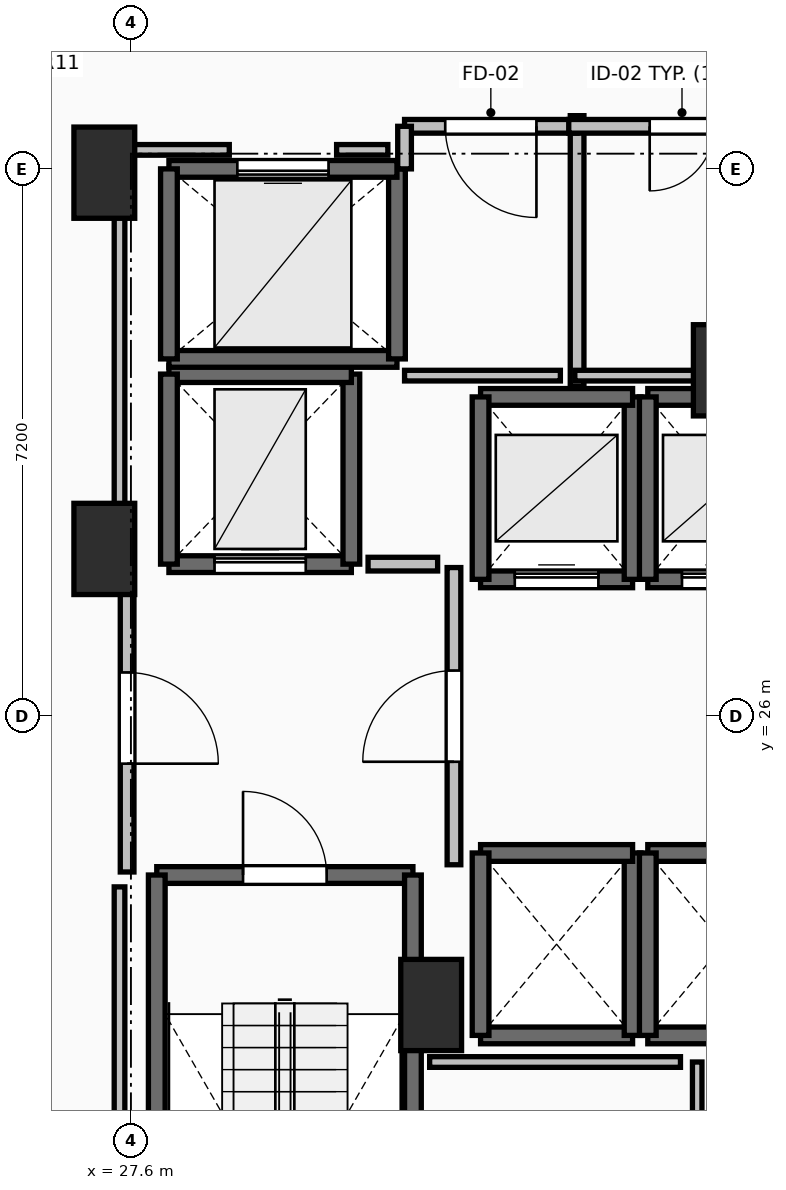
"""IFC4 building model, lengths in metres.
Left out: names, types, materials, properties, quantities, classifications, styles, units other than length and angle.
Written with IfcOpenShell. Run it as: python <this file> out.ifc"""

import sys

from ifc_helpers import new_model, si_unit, direction, frame, frame_2d, origin, origin_2d, place, context, subcontext, project, spatial, rectangle, extrude, element, fill, save


model = new_model("IFC4")
c1 = context("Model", 3, precision=1e-05, world=origin(), true_north=direction((0.0, 1.0)))
c2 = subcontext(c1, "Body", "Model", "MODEL_VIEW")
j1 = project(units=[si_unit("LENGTHUNIT", "METRE"), si_unit("PLANEANGLEUNIT", "RADIAN")], contexts=[c1])
p1 = place(None, origin())
s1 = spatial("IfcSite", under=j1, at=p1, CompositionType="ELEMENT")
p2 = place(p1, origin())
s2 = spatial("IfcBuilding", under=s1, at=p2, CompositionType="ELEMENT")
p3 = place(p2, frame((0.0, 0.0, 31.0)))
s3 = spatial("IfcBuildingStorey", under=s2, at=p3, CompositionType="ELEMENT", Elevation=31.0)
for number, where, z_axis, x_axis in (
    (1, (27.25, 28.2, 0.0), (0.0, 0.0, 1.0), (1.0, 0.0, 0.0)),
    (2, (27.25, 33.15, 0.0), (0.0, 0.0, 1.0), (1.0, 0.0, 0.0)),
    (3, (31.55, 22.2, 0.0), (0.0, 0.0, 1.0), (1.0, 0.0, 0.0)),
    (4, (35.4, 30.55, 0.0), (0.0, 0.0, 1.0), (1.0, 0.0, 0.0)),
):
    element("IfcColumn", number, at=place(p3, frame(where, z_axis=z_axis, x_axis=x_axis)), inside=s3, PredefinedType="PILASTER", context=c2, shape_type="SweptSolid", body=[
        extrude(rectangle(XDim=0.8, YDim=1.2, at=origin_2d()), origin(), (0.0, 0.0, 1.0), 3.5),
    ])
p4 = place(p3, frame((27.94, 23.91, 0.0), z_axis=(0.0, 0.0, 1.0), x_axis=(1.0, 0.0, 0.0)))
e5 = element("IfcWall", 5, at=p4, inside=s3, PredefinedType="SOLIDWALL", context=c2, shape_type="SweptSolid", body=[
    extrude(rectangle(XDim=3.37, YDim=0.22, at=frame_2d((1.685, 0.0))), origin(), (0.0, 0.0, 1.0), 3.24),
])
p5 = place(p4, frame((1.135, 0.0, 0.0)))
e6 = element("IfcOpeningElement", 6, at=p5, cuts=e5, PredefinedType="OPENING", context=c2, shape_type="SweptSolid", body=[
    extrude(rectangle(XDim=1.1, YDim=2.15, at=frame_2d((0.55, 1.075))), frame((0.0, 0.125, 0.0), z_axis=(0.0, -1.0, 0.0), x_axis=(1.0, 0.0, 0.0)), (0.0, 0.0, 1.0), 0.25),
])
for number, where, z_axis, x_axis in (
    (7, (31.31, 23.91, 0.0), (0.0, 0.0, 1.0), (0.0, -1.0, 0.0)),
    (8, (27.94, 16.49, 0.0), (0.0, 0.0, 1.0), (0.0, 1.0, 0.0)),
):
    element("IfcWall", number, at=place(p3, frame(where, z_axis=z_axis, x_axis=x_axis)), inside=s3, PredefinedType="SOLIDWALL", context=c2, shape_type="SweptSolid", body=[
        extrude(rectangle(XDim=7.42, YDim=0.22, at=frame_2d((3.71, 0.0))), origin(), (0.0, 0.0, 1.0), 3.24),
    ])
p6 = place(p3, frame((32.2, 27.8, 0.0), z_axis=(0.0, 0.0, 1.0), x_axis=(1.0, 0.0, 0.0)))
e9 = element("IfcWall", 9, at=p6, inside=s3, PredefinedType="SOLIDWALL", context=c2, shape_type="SweptSolid", body=[
    extrude(rectangle(XDim=2.0, YDim=0.22, at=frame_2d((1.0, 0.0))), origin(), (0.0, 0.0, 1.0), 3.24),
])
p7 = place(p6, frame((0.45, 0.0, 0.0)))
e10 = element("IfcOpeningElement", 10, at=p7, cuts=e9, PredefinedType="OPENING", context=c2, shape_type="SweptSolid", body=[
    extrude(rectangle(XDim=1.1, YDim=2.2, at=frame_2d((0.55, 1.1))), frame((0.0, 0.125, 0.0), z_axis=(0.0, -1.0, 0.0), x_axis=(1.0, 0.0, 0.0)), (0.0, 0.0, 1.0), 0.25),
])
p8 = place(p3, frame((34.2, 27.8, 0.0), z_axis=(0.0, 0.0, 1.0), x_axis=(0.0, 1.0, 0.0)))
e11 = element("IfcWall", 11, at=p8, inside=s3, PredefinedType="SOLIDWALL", context=c2, shape_type="SweptSolid", body=[
    extrude(rectangle(XDim=2.4, YDim=0.22, at=frame_2d((1.2, 0.0))), origin(), (0.0, 0.0, 1.0), 3.24),
])
p9 = place(p3, frame((34.2, 30.2, 0.0), z_axis=(0.0, 0.0, 1.0), x_axis=(-1.0, 0.0, 0.0)))
e12 = element("IfcWall", 12, at=p9, inside=s3, PredefinedType="SOLIDWALL", context=c2, shape_type="SweptSolid", body=[
    extrude(rectangle(XDim=2.0, YDim=0.22, at=frame_2d((1.0, 0.0))), origin(), (0.0, 0.0, 1.0), 3.24),
])
p10 = place(p3, frame((32.2, 30.2, 0.0), z_axis=(0.0, 0.0, 1.0), x_axis=(0.0, -1.0, 0.0)))
e13 = element("IfcWall", 13, at=p10, inside=s3, PredefinedType="SOLIDWALL", context=c2, shape_type="SweptSolid", body=[
    extrude(rectangle(XDim=2.4, YDim=0.22, at=frame_2d((1.2, 0.0))), origin(), (0.0, 0.0, 1.0), 3.24),
])
p11 = place(p3, frame((34.4, 27.8, 0.0), z_axis=(0.0, 0.0, 1.0), x_axis=(1.0, 0.0, 0.0)))
e14 = element("IfcWall", 14, at=p11, inside=s3, PredefinedType="SOLIDWALL", context=c2, shape_type="SweptSolid", body=[
    extrude(rectangle(XDim=2.0, YDim=0.22, at=frame_2d((1.0, 0.0))), origin(), (0.0, 0.0, 1.0), 3.24),
])
p12 = place(p11, frame((0.45, 0.0, 0.0)))
e15 = element("IfcOpeningElement", 15, at=p12, cuts=e14, PredefinedType="OPENING", context=c2, shape_type="SweptSolid", body=[
    extrude(rectangle(XDim=1.1, YDim=2.2, at=frame_2d((0.55, 1.1))), frame((0.0, 0.125, 0.0), z_axis=(0.0, -1.0, 0.0), x_axis=(1.0, 0.0, 0.0)), (0.0, 0.0, 1.0), 0.25),
])
p13 = place(p3, frame((36.4, 30.2, 0.0), z_axis=(0.0, 0.0, 1.0), x_axis=(-1.0, 0.0, 0.0)))
e16 = element("IfcWall", 16, at=p13, inside=s3, PredefinedType="SOLIDWALL", context=c2, shape_type="SweptSolid", body=[
    extrude(rectangle(XDim=2.0, YDim=0.22, at=frame_2d((1.0, 0.0))), origin(), (0.0, 0.0, 1.0), 3.24),
])
p14 = place(p3, frame((34.4, 30.2, 0.0), z_axis=(0.0, 0.0, 1.0), x_axis=(0.0, -1.0, 0.0)))
e17 = element("IfcWall", 17, at=p14, inside=s3, PredefinedType="SOLIDWALL", context=c2, shape_type="SweptSolid", body=[
    extrude(rectangle(XDim=2.4, YDim=0.22, at=frame_2d((1.2, 0.0))), origin(), (0.0, 0.0, 1.0), 3.24),
])
p15 = place(p3, frame((32.2, 21.8, 0.0), z_axis=(0.0, 0.0, 1.0), x_axis=(1.0, 0.0, 0.0)))
e18 = element("IfcWall", 18, at=p15, inside=s3, PredefinedType="SOLIDWALL", context=c2, shape_type="SweptSolid", body=[
    extrude(rectangle(XDim=2.0, YDim=0.22, at=frame_2d((1.0, 0.0))), origin(), (0.0, 0.0, 1.0), 3.24),
])
p16 = place(p3, frame((34.2, 21.8, 0.0), z_axis=(0.0, 0.0, 1.0), x_axis=(0.0, 1.0, 0.0)))
e19 = element("IfcWall", 19, at=p16, inside=s3, PredefinedType="SOLIDWALL", context=c2, shape_type="SweptSolid", body=[
    extrude(rectangle(XDim=2.4, YDim=0.22, at=frame_2d((1.2, 0.0))), origin(), (0.0, 0.0, 1.0), 3.24),
])
p17 = place(p3, frame((34.2, 24.2, 0.0), z_axis=(0.0, 0.0, 1.0), x_axis=(-1.0, 0.0, 0.0)))
e20 = element("IfcWall", 20, at=p17, inside=s3, PredefinedType="SOLIDWALL", context=c2, shape_type="SweptSolid", body=[
    extrude(rectangle(XDim=2.0, YDim=0.22, at=frame_2d((1.0, 0.0))), origin(), (0.0, 0.0, 1.0), 3.24),
])
p18 = place(p3, frame((32.2, 24.2, 0.0), z_axis=(0.0, 0.0, 1.0), x_axis=(0.0, -1.0, 0.0)))
e21 = element("IfcWall", 21, at=p18, inside=s3, PredefinedType="SOLIDWALL", context=c2, shape_type="SweptSolid", body=[
    extrude(rectangle(XDim=2.4, YDim=0.22, at=frame_2d((1.2, 0.0))), origin(), (0.0, 0.0, 1.0), 3.24),
])
for number, where, z_axis, x_axis in (
    (22, (34.4, 21.8, 0.0), (0.0, 0.0, 1.0), (1.0, 0.0, 0.0)),
    (23, (36.4, 24.2, 0.0), (0.0, 0.0, 1.0), (-1.0, 0.0, 0.0)),
):
    element("IfcWall", number, at=place(p3, frame(where, z_axis=z_axis, x_axis=x_axis)), inside=s3, PredefinedType="SOLIDWALL", context=c2, shape_type="SweptSolid", body=[
        extrude(rectangle(XDim=2.0, YDim=0.22, at=frame_2d((1.0, 0.0))), origin(), (0.0, 0.0, 1.0), 3.24),
    ])
p19 = place(p3, frame((34.4, 24.2, 0.0), z_axis=(0.0, 0.0, 1.0), x_axis=(0.0, -1.0, 0.0)))
e24 = element("IfcWall", 24, at=p19, inside=s3, PredefinedType="SOLIDWALL", context=c2, shape_type="SweptSolid", body=[
    extrude(rectangle(XDim=2.4, YDim=0.22, at=frame_2d((1.2, 0.0))), origin(), (0.0, 0.0, 1.0), 3.24),
])
p20 = place(p3, frame((28.1, 28.0, 0.0), z_axis=(0.0, 0.0, 1.0), x_axis=(1.0, 0.0, 0.0)))
e25 = element("IfcWall", 25, at=p20, inside=s3, PredefinedType="SHEAR", context=c2, shape_type="SweptSolid", body=[
    extrude(rectangle(XDim=2.4, YDim=0.22, at=frame_2d((1.2, 0.0))), origin(), (0.0, 0.0, 1.0), 3.24),
])
p21 = place(p20, frame((0.6, 0.0, 0.0)))
e26 = element("IfcOpeningElement", 26, at=p21, cuts=e25, PredefinedType="OPENING", context=c2, shape_type="SweptSolid", body=[
    extrude(rectangle(XDim=1.2, YDim=2.2, at=frame_2d((0.6, 1.1))), frame((0.0, 0.125, 0.0), z_axis=(0.0, -1.0, 0.0), x_axis=(1.0, 0.0, 0.0)), (0.0, 0.0, 1.0), 0.25),
])
p22 = place(p3, frame((30.5, 28.0, 0.0), z_axis=(0.0, 0.0, 1.0), x_axis=(0.0, 1.0, 0.0)))
e27 = element("IfcWall", 27, at=p22, inside=s3, PredefinedType="SHEAR", context=c2, shape_type="SweptSolid", body=[
    extrude(rectangle(XDim=2.5, YDim=0.22, at=frame_2d((1.25, 0.0))), origin(), (0.0, 0.0, 1.0), 3.24),
])
p23 = place(p3, frame((30.5, 30.5, 0.0), z_axis=(0.0, 0.0, 1.0), x_axis=(-1.0, 0.0, 0.0)))
e28 = element("IfcWall", 28, at=p23, inside=s3, PredefinedType="SHEAR", context=c2, shape_type="SweptSolid", body=[
    extrude(rectangle(XDim=2.4, YDim=0.22, at=frame_2d((1.2, 0.0))), origin(), (0.0, 0.0, 1.0), 3.24),
])
p24 = place(p3, frame((28.1, 30.5, 0.0), z_axis=(0.0, 0.0, 1.0), x_axis=(0.0, -1.0, 0.0)))
e29 = element("IfcWall", 29, at=p24, inside=s3, PredefinedType="SHEAR", context=c2, shape_type="SweptSolid", body=[
    extrude(rectangle(XDim=2.5, YDim=0.22, at=frame_2d((1.25, 0.0))), origin(), (0.0, 0.0, 1.0), 3.24),
])
p25 = place(p3, frame((28.1, 30.7, 0.0), z_axis=(0.0, 0.0, 1.0), x_axis=(1.0, 0.0, 0.0)))
e30 = element("IfcWall", 30, at=p25, inside=s3, PredefinedType="SOLIDWALL", context=c2, shape_type="SweptSolid", body=[
    extrude(rectangle(XDim=3.0, YDim=0.22, at=frame_2d((1.5, 0.0))), origin(), (0.0, 0.0, 1.0), 3.24),
])
p26 = place(p3, frame((31.1, 30.7, 0.0), z_axis=(0.0, 0.0, 1.0), x_axis=(0.0, 1.0, 0.0)))
e31 = element("IfcWall", 31, at=p26, inside=s3, PredefinedType="SOLIDWALL", context=c2, shape_type="SweptSolid", body=[
    extrude(rectangle(XDim=2.5, YDim=0.22, at=frame_2d((1.25, 0.0))), origin(), (0.0, 0.0, 1.0), 3.24),
])
p27 = place(p3, frame((31.1, 33.2, 0.0), z_axis=(0.0, 0.0, 1.0), x_axis=(-1.0, 0.0, 0.0)))
e32 = element("IfcWall", 32, at=p27, inside=s3, PredefinedType="SOLIDWALL", context=c2, shape_type="SweptSolid", body=[
    extrude(rectangle(XDim=3.0, YDim=0.22, at=frame_2d((1.5, 0.0))), origin(), (0.0, 0.0, 1.0), 3.24),
])
p28 = place(p27, frame((0.9, 0.0, 0.0)))
e33 = element("IfcOpeningElement", 33, at=p28, cuts=e32, PredefinedType="OPENING", context=c2, shape_type="SweptSolid", body=[
    extrude(rectangle(XDim=1.2, YDim=2.2, at=frame_2d((0.6, 1.1))), frame((0.0, 0.125, 0.0), z_axis=(0.0, -1.0, 0.0), x_axis=(1.0, 0.0, 0.0)), (0.0, 0.0, 1.0), 0.25),
])
p29 = place(p3, frame((28.1, 33.2, 0.0), z_axis=(0.0, 0.0, 1.0), x_axis=(0.0, -1.0, 0.0)))
e34 = element("IfcWall", 34, at=p29, inside=s3, PredefinedType="SOLIDWALL", context=c2, shape_type="SweptSolid", body=[
    extrude(rectangle(XDim=2.5, YDim=0.22, at=frame_2d((1.25, 0.0))), origin(), (0.0, 0.0, 1.0), 3.24),
])
p30 = place(p3, frame((31.85, 24.045, 0.0), z_axis=(0.0, 0.0, 1.0), x_axis=(0.0, 1.0, 0.0)))
e35 = element("IfcWall", 35, at=p30, inside=s3, PredefinedType="PARTITIONING", context=c2, shape_type="SweptSolid", body=[
    extrude(rectangle(XDim=3.91, YDim=0.18, at=frame_2d((1.955, 0.0))), origin(), (0.0, 0.0, 1.0), 3.24),
])
p31 = place(p30, frame((1.355, 0.0, 0.0)))
e36 = element("IfcOpeningElement", 36, at=p31, cuts=e35, PredefinedType="OPENING", context=c2, shape_type="SweptSolid", body=[
    extrude(rectangle(XDim=1.2, YDim=2.15, at=frame_2d((0.6, 1.075))), frame((0.0, 0.105, 0.0), z_axis=(0.0, -1.0, 0.0), x_axis=(1.0, 0.0, 0.0)), (0.0, 0.0, 1.0), 0.21),
])
p32 = place(p3, frame((27.55, 28.0, 0.0), z_axis=(0.0, 0.0, 1.0), x_axis=(0.0, -1.0, 0.0)))
e37 = element("IfcWall", 37, at=p32, inside=s3, PredefinedType="PARTITIONING", context=c2, shape_type="SweptSolid", body=[
    extrude(rectangle(XDim=4.05, YDim=0.18, at=frame_2d((2.025, 0.0))), origin(), (0.0, 0.0, 1.0), 3.24),
])
p33 = place(p32, frame((1.425, 0.0, 0.0)))
e38 = element("IfcOpeningElement", 38, at=p33, cuts=e37, PredefinedType="OPENING", context=c2, shape_type="SweptSolid", body=[
    extrude(rectangle(XDim=1.2, YDim=2.15, at=frame_2d((0.6, 1.075))), frame((0.0, 0.105, 0.0), z_axis=(0.0, -1.0, 0.0), x_axis=(1.0, 0.0, 0.0)), (0.0, 0.0, 1.0), 0.21),
])
p34 = place(p3, frame((33.47, 30.34, 0.0), z_axis=(0.0, 0.0, 1.0), x_axis=(0.0, 1.0, 0.0)))
e39 = element("IfcWall", 39, at=p34, inside=s3, PredefinedType="PARTITIONING", context=c2, shape_type="SweptSolid", body=[
    extrude(rectangle(XDim=3.56, YDim=0.18, at=frame_2d((1.78, 0.0))), origin(), (0.0, 0.0, 1.0), 3.24),
])
p35 = place(p3, frame((33.47, 33.76, 0.0), z_axis=(0.0, 0.0, 1.0), x_axis=(-1.0, 0.0, 0.0)))
e40 = element("IfcWall", 40, at=p35, inside=s3, PredefinedType="PARTITIONING", context=c2, shape_type="SweptSolid", body=[
    extrude(rectangle(XDim=2.27, YDim=0.18, at=frame_2d((1.135, 0.0))), origin(), (0.0, 0.0, 1.0), 3.24),
])
p36 = place(p35, frame((0.535, 0.0, 0.0)))
e41 = element("IfcOpeningElement", 41, at=p36, cuts=e40, PredefinedType="OPENING", context=c2, shape_type="SweptSolid", body=[
    extrude(rectangle(XDim=1.2, YDim=2.15, at=frame_2d((0.6, 1.075))), frame((0.0, 0.105, 0.0), z_axis=(0.0, -1.0, 0.0), x_axis=(1.0, 0.0, 0.0)), (0.0, 0.0, 1.0), 0.21),
])
p37 = place(p3, frame((31.2, 33.76, 0.0), z_axis=(0.0, 0.0, 1.0), x_axis=(0.0, -1.0, 0.0)))
e42 = element("IfcWall", 42, at=p37, inside=s3, PredefinedType="PARTITIONING", context=c2, shape_type="SweptSolid", body=[
    extrude(rectangle(XDim=0.56, YDim=0.18, at=frame_2d((0.28, 0.0))), origin(), (0.0, 0.0, 1.0), 3.24),
])
p38 = place(p3, frame((36.34, 33.76, 0.0), z_axis=(0.0, 0.0, 1.0), x_axis=(-1.0, 0.0, 0.0)))
e43 = element("IfcWall", 43, at=p38, inside=s3, PredefinedType="PARTITIONING", context=c2, shape_type="SweptSolid", body=[
    extrude(rectangle(XDim=2.98, YDim=0.18, at=frame_2d((1.49, 0.0))), origin(), (0.0, 0.0, 1.0), 3.24),
])
p39 = place(p38, frame((1.065, 0.0, 0.0)))
e44 = element("IfcOpeningElement", 44, at=p39, cuts=e43, PredefinedType="OPENING", context=c2, shape_type="SweptSolid", body=[
    extrude(rectangle(XDim=0.85, YDim=2.1, at=frame_2d((0.425, 1.05))), frame((0.0, 0.105, 0.0), z_axis=(0.0, -1.0, 0.0), x_axis=(1.0, 0.0, 0.0)), (0.0, 0.0, 1.0), 0.21),
])
p40 = place(p3, frame((35.05, 16.32, 0.0), z_axis=(0.0, 0.0, 1.0), x_axis=(0.0, 1.0, 0.0)))
e45 = element("IfcWall", 45, at=p40, inside=s3, PredefinedType="PARTITIONING", context=c2, shape_type="SweptSolid", body=[
    extrude(rectangle(XDim=5.13, YDim=0.125, at=frame_2d((2.565, 0.0))), origin(), (0.0, 0.0, 1.0), 3.24),
])
p41 = place(p3, frame((31.635, 28.0, 0.0), z_axis=(0.0, 0.0, 1.0), x_axis=(-1.0, 0.0, 0.0)))
e46 = element("IfcWall", 46, at=p41, inside=s3, PredefinedType="PARTITIONING", context=c2, shape_type="SweptSolid", body=[
    extrude(rectangle(XDim=0.915, YDim=0.18, at=frame_2d((0.458, 0.0))), origin(), (0.0, 0.0, 1.0), 3.24),
])
p42 = place(p3, frame((31.2, 30.48, 0.0), z_axis=(0.0, 0.0, 1.0), x_axis=(1.0, 0.0, 0.0)))
e47 = element("IfcWall", 47, at=p42, inside=s3, PredefinedType="PARTITIONING", context=c2, shape_type="SweptSolid", body=[
    extrude(rectangle(XDim=2.05, YDim=0.14, at=frame_2d((1.025, 0.0))), origin(), (0.0, 0.0, 1.0), 3.24),
])
p43 = place(p3, frame((33.44, 30.48, 0.0), z_axis=(0.0, 0.0, 1.0), x_axis=(1.0, 0.0, 0.0)))
e48 = element("IfcWall", 48, at=p43, inside=s3, PredefinedType="PARTITIONING", context=c2, shape_type="SweptSolid", body=[
    extrude(rectangle(XDim=2.79, YDim=0.14, at=frame_2d((1.395, 0.0))), origin(), (0.0, 0.0, 1.0), 2.432),
])
p44 = place(p3, frame((34.83, 21.45, 0.0), z_axis=(0.0, 0.0, 1.0), x_axis=(-1.0, 0.0, 0.0)))
e49 = element("IfcWall", 49, at=p44, inside=s3, PredefinedType="PARTITIONING", context=c2, shape_type="SweptSolid", body=[
    extrude(rectangle(XDim=3.3, YDim=0.14, at=frame_2d((1.65, 0.0))), origin(), (0.0, 0.0, 1.0), 3.24),
])
p45 = place(p3, frame((27.45, 16.24, 0.0), z_axis=(0.0, 0.0, 1.0), x_axis=(0.0, 1.0, 0.0)))
e50 = element("IfcWall", 50, at=p45, inside=s3, PredefinedType="PARTITIONING", context=c2, shape_type="SweptSolid", body=[
    extrude(rectangle(XDim=7.514, YDim=0.14, at=frame_2d((3.757, 0.0))), origin(), (0.0, 0.0, 1.0), 2.432),
])
p46 = place(p3, frame((27.45, 28.196, 0.0), z_axis=(0.0, 0.0, 1.0), x_axis=(0.0, 1.0, 0.0)))
e51 = element("IfcWall", 51, at=p46, inside=s3, PredefinedType="PARTITIONING", context=c2, shape_type="SweptSolid", body=[
    extrude(rectangle(XDim=5.254, YDim=0.14, at=frame_2d((2.627, 0.0))), origin(), (0.0, 0.0, 1.0), 2.432),
])
p47 = place(p3, frame((27.45, 33.45, 0.0), z_axis=(0.0, 0.0, 1.0), x_axis=(1.0, 0.0, 0.0)))
e52 = element("IfcWall", 52, at=p47, inside=s3, PredefinedType="PARTITIONING", context=c2, shape_type="SweptSolid", body=[
    extrude(rectangle(XDim=1.444, YDim=0.14, at=frame_2d((0.722, 0.0))), origin(), (0.0, 0.0, 1.0), 2.432),
])
p48 = place(p3, frame((30.306, 33.45, 0.0), z_axis=(0.0, 0.0, 1.0), x_axis=(1.0, 0.0, 0.0)))
e53 = element("IfcWall", 53, at=p48, inside=s3, PredefinedType="PARTITIONING", context=c2, shape_type="SweptSolid", body=[
    extrude(rectangle(XDim=0.674, YDim=0.14, at=frame_2d((0.337, 0.0))), origin(), (0.0, 0.0, 1.0), 3.24),
])
p49 = place(p5, origin())
e54 = element("IfcDoor", 54, at=p49, inside=s3, OperationType="SINGLE_SWING_LEFT", PredefinedType="DOOR", context=c2, shape_type="SweptSolid", body=[
    extrude(rectangle(XDim=1.1, YDim=2.15, at=frame_2d((0.55, 1.075))), frame((0.0, 0.025, 0.0), z_axis=(0.0, -1.0, 0.0), x_axis=(1.0, 0.0, 0.0)), (0.0, 0.0, 1.0), 0.05),
])
fill(e6, e54)
p50 = place(p7, origin())
e55 = element("IfcDoor", 55, at=p50, inside=s3, OperationType="SLIDING_TO_LEFT", PredefinedType="DOOR", context=c2, shape_type="SweptSolid", body=[
    extrude(rectangle(XDim=1.1, YDim=2.2, at=frame_2d((0.55, 1.1))), frame((0.0, 0.025, 0.0), z_axis=(0.0, -1.0, 0.0), x_axis=(1.0, 0.0, 0.0)), (0.0, 0.0, 1.0), 0.05),
])
fill(e10, e55)
p51 = place(p12, origin())
e56 = element("IfcDoor", 56, at=p51, inside=s3, OperationType="SLIDING_TO_LEFT", PredefinedType="DOOR", context=c2, shape_type="SweptSolid", body=[
    extrude(rectangle(XDim=1.1, YDim=2.2, at=frame_2d((0.55, 1.1))), frame((0.0, 0.025, 0.0), z_axis=(0.0, -1.0, 0.0), x_axis=(1.0, 0.0, 0.0)), (0.0, 0.0, 1.0), 0.05),
])
fill(e15, e56)
p52 = place(p21, origin())
e57 = element("IfcDoor", 57, at=p52, inside=s3, OperationType="SLIDING_TO_LEFT", PredefinedType="DOOR", context=c2, shape_type="SweptSolid", body=[
    extrude(rectangle(XDim=1.2, YDim=2.2, at=frame_2d((0.6, 1.1))), frame((0.0, 0.025, 0.0), z_axis=(0.0, -1.0, 0.0), x_axis=(1.0, 0.0, 0.0)), (0.0, 0.0, 1.0), 0.05),
])
fill(e26, e57)
p53 = place(p28, origin())
e58 = element("IfcDoor", 58, at=p53, inside=s3, OperationType="SLIDING_TO_LEFT", PredefinedType="DOOR", context=c2, shape_type="SweptSolid", body=[
    extrude(rectangle(XDim=1.2, YDim=2.2, at=frame_2d((0.6, 1.1))), frame((0.0, 0.025, 0.0), z_axis=(0.0, -1.0, 0.0), x_axis=(1.0, 0.0, 0.0)), (0.0, 0.0, 1.0), 0.05),
])
fill(e33, e58)
p54 = place(p31, origin())
e59 = element("IfcDoor", 59, at=p54, inside=s3, OperationType="SINGLE_SWING_LEFT", PredefinedType="DOOR", context=c2, shape_type="SweptSolid", body=[
    extrude(rectangle(XDim=1.2, YDim=2.15, at=frame_2d((0.6, 1.075))), frame((0.0, 0.025, 0.0), z_axis=(0.0, -1.0, 0.0), x_axis=(1.0, 0.0, 0.0)), (0.0, 0.0, 1.0), 0.05),
])
fill(e36, e59)
p55 = place(p33, origin())
e60 = element("IfcDoor", 60, at=p55, inside=s3, OperationType="SINGLE_SWING_RIGHT", PredefinedType="DOOR", context=c2, shape_type="SweptSolid", body=[
    extrude(rectangle(XDim=1.2, YDim=2.15, at=frame_2d((0.6, 1.075))), frame((0.0, 0.025, 0.0), z_axis=(0.0, -1.0, 0.0), x_axis=(1.0, 0.0, 0.0)), (0.0, 0.0, 1.0), 0.05),
])
fill(e38, e60)
p56 = place(p36, origin())
e61 = element("IfcDoor", 61, at=p56, inside=s3, OperationType="SINGLE_SWING_LEFT", PredefinedType="DOOR", context=c2, shape_type="SweptSolid", body=[
    extrude(rectangle(XDim=1.2, YDim=2.15, at=frame_2d((0.6, 1.075))), frame((0.0, 0.025, 0.0), z_axis=(0.0, -1.0, 0.0), x_axis=(1.0, 0.0, 0.0)), (0.0, 0.0, 1.0), 0.05),
])
fill(e41, e61)
p57 = place(p39, origin())
e62 = element("IfcDoor", 62, at=p57, inside=s3, OperationType="SINGLE_SWING_RIGHT", PredefinedType="DOOR", context=c2, shape_type="SweptSolid", body=[
    extrude(rectangle(XDim=0.85, YDim=2.1, at=frame_2d((0.425, 1.05))), frame((0.0, 0.025, 0.0), z_axis=(0.0, -1.0, 0.0), x_axis=(1.0, 0.0, 0.0)), (0.0, 0.0, 1.0), 0.05),
])
fill(e44, e62)
save(model, sys.argv[1])
